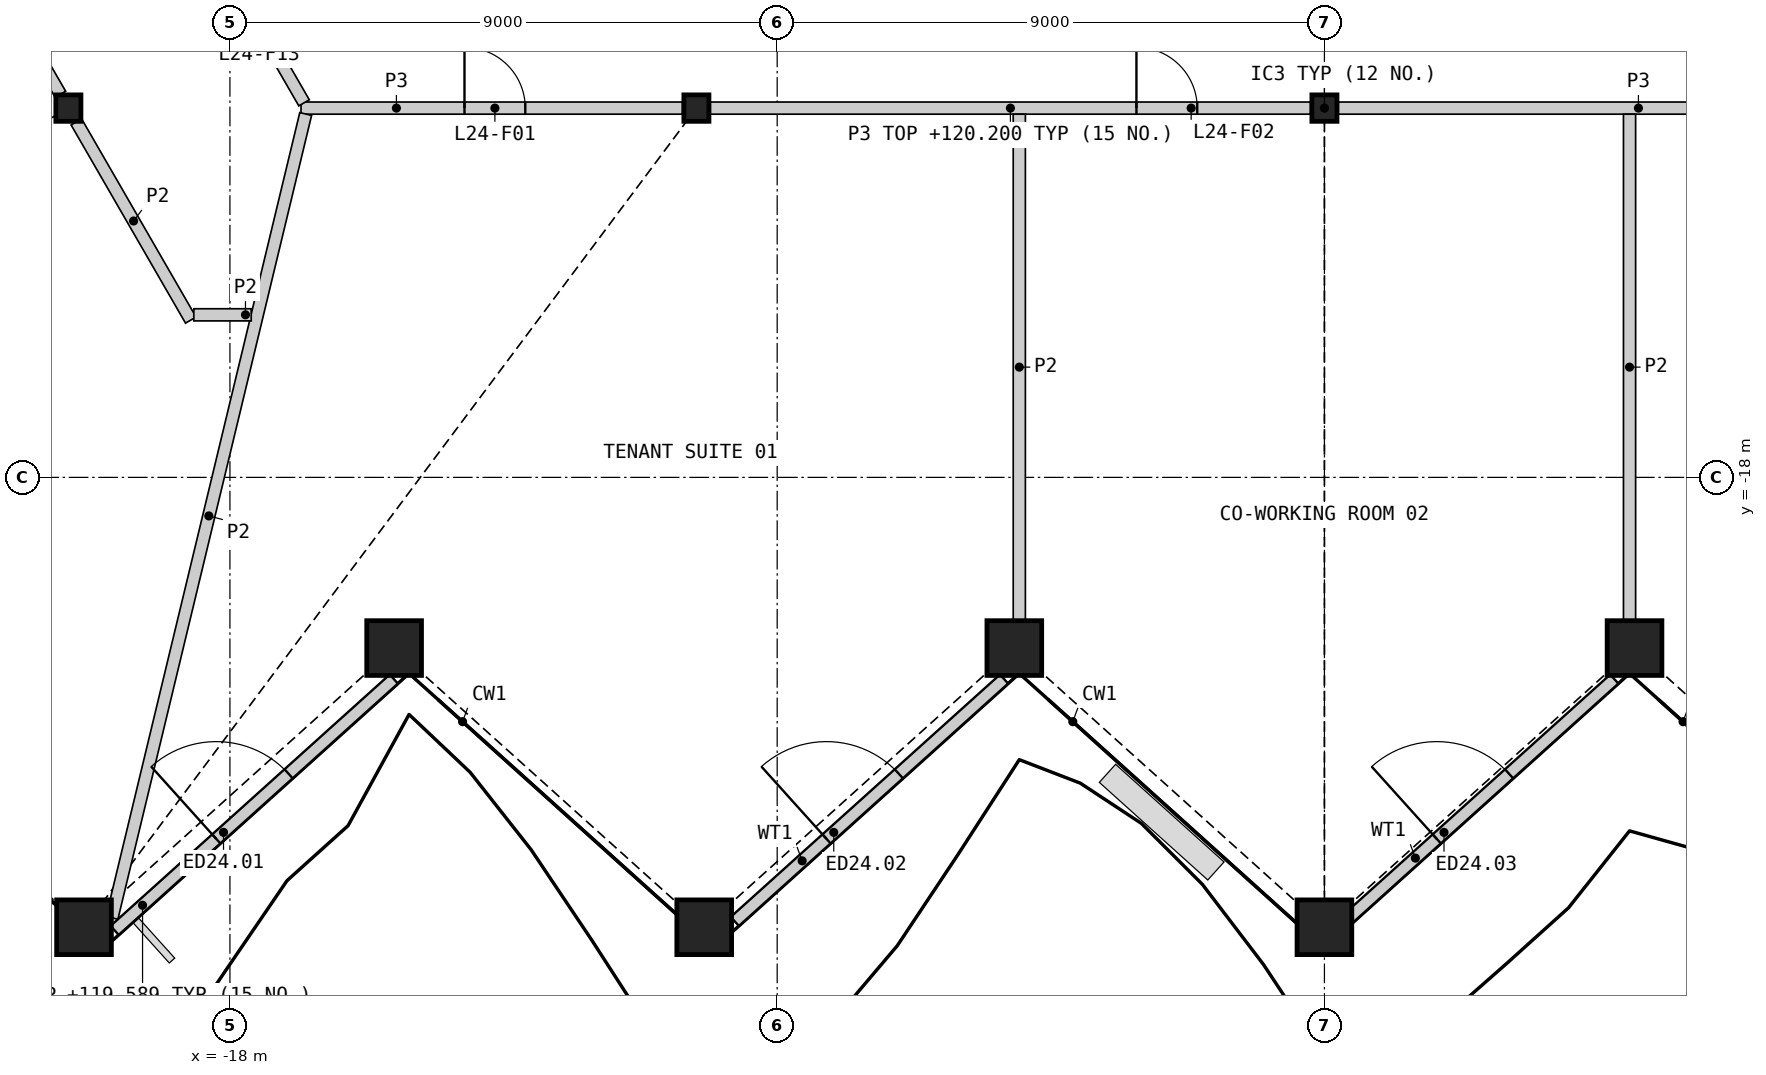
"""IFC4 building model, lengths in metres.
Left out: names, types, materials, properties, quantities, classifications, styles, units other than length and angle.
Written with IfcOpenShell. Run it as: python <this file> out.ifc"""

import sys

from ifc_helpers import new_model, si_unit, direction, frame, frame_2d, origin, origin_2d, place, context, subcontext, project, spatial, rectangle, hollow_rectangle, i_section, extrude, element, fill, save


model = new_model("IFC4")
c1 = context("Model", 3, precision=1e-05, world=origin(), true_north=direction((0.0, 1.0)))
c2 = subcontext(c1, "Body", "Model", "MODEL_VIEW")
j1 = project(units=[si_unit("LENGTHUNIT", "METRE"), si_unit("PLANEANGLEUNIT", "RADIAN")], contexts=[c1])
p1 = place(None, origin())
s1 = spatial("IfcSite", under=j1, at=p1, CompositionType="ELEMENT")
p2 = place(p1, origin())
s2 = spatial("IfcBuilding", under=s1, at=p2, CompositionType="ELEMENT")
p3 = place(p2, frame((0.0, 0.0, 116.4)))
s3 = spatial("IfcBuildingStorey", under=s2, at=p3, CompositionType="ELEMENT", Elevation=116.4)
for number, where, z_axis, x_axis in (
    (1, (-20.4, -25.399, 0.0), (0.0, 0.0, 1.0), (1.0, 0.0, 0.0)),
    (2, (-15.3, -20.807, 0.0), (0.0, 0.0, 1.0), (1.0, 0.0, 0.0)),
    (3, (-10.2, -25.399, 0.0), (0.0, 0.0, 1.0), (1.0, 0.0, 0.0)),
    (4, (-5.1, -20.807, 0.0), (0.0, 0.0, 1.0), (1.0, 0.0, 0.0)),
    (5, (0.0, -25.399, 0.0), (0.0, 0.0, 1.0), (1.0, 0.0, 0.0)),
    (6, (5.1, -20.807, 0.0), (0.0, 0.0, 1.0), (1.0, 0.0, 0.0)),
):
    element("IfcColumn", number, at=place(p3, frame(where, z_axis=z_axis, x_axis=x_axis)), inside=s3, PredefinedType="COLUMN", context=c2, shape_type="SweptSolid", body=[
        extrude(hollow_rectangle(XDim=0.9, YDim=0.9, WallThickness=0.06, at=origin_2d()), origin(), (0.0, 0.0, 1.0), 4.2),
    ])
for number, where, z_axis, x_axis in (
    (7, (-20.657, -11.926, 0.0), (0.0, 0.0, 1.0), (1.0, 0.0, 0.0)),
    (8, (-10.328, -11.926, 0.0), (0.0, 0.0, 1.0), (1.0, 0.0, 0.0)),
    (9, (0.0, -11.926, 0.0), (0.0, 0.0, 1.0), (1.0, 0.0, 0.0)),
):
    element("IfcColumn", number, at=place(p3, frame(where, z_axis=z_axis, x_axis=x_axis)), inside=s3, PredefinedType="COLUMN", context=c2, shape_type="SweptSolid", body=[
        extrude(i_section(OverallWidth=0.412, OverallDepth=0.435, WebThickness=0.036, FlangeThickness=0.057, at=origin_2d()), origin(), (0.0, 0.0, 1.0), 4.2),
    ])
p4 = place(p3, frame((-19.896, -25.451, 0.0), z_axis=(0.0, 0.0, 1.0), x_axis=(0.743162487272, 0.669110990428, 0.0)))
e10 = element("IfcWall", 10, at=p4, inside=s3, PredefinedType="SOLIDWALL", context=c2, shape_type="SweptSolid", body=[
    extrude(rectangle(XDim=6.178, YDim=0.2, at=frame_2d((3.089, 0.0))), origin(), (0.0, 0.0, 1.0), 3.189),
])
p5 = place(p4, frame((2.25, 0.0, 0.0)))
e11 = element("IfcOpeningElement", 11, at=p5, cuts=e10, PredefinedType="OPENING", context=c2, shape_type="SweptSolid", body=[
    extrude(rectangle(XDim=1.6, YDim=2.4, at=frame_2d((0.8, 1.2))), frame((0.0, 0.11, 0.0), z_axis=(0.0, -1.0, 0.0), x_axis=(1.0, 0.0, 0.0)), (0.0, 0.0, 1.0), 0.22),
])
p6 = place(p3, frame((-9.696, -25.303, 0.0), z_axis=(0.0, 0.0, 1.0), x_axis=(0.743141307259, 0.669134513716, 0.0)))
e12 = element("IfcWall", 12, at=p6, inside=s3, PredefinedType="SOLIDWALL", context=c2, shape_type="SweptSolid", body=[
    extrude(rectangle(XDim=5.958, YDim=0.2, at=frame_2d((2.979, 0.0))), origin(), (0.0, 0.0, 1.0), 3.189),
])
p7 = place(p6, frame((2.029, 0.0, 0.0)))
e13 = element("IfcOpeningElement", 13, at=p7, cuts=e12, PredefinedType="OPENING", context=c2, shape_type="SweptSolid", body=[
    extrude(rectangle(XDim=1.6, YDim=2.4, at=frame_2d((0.8, 1.2))), frame((0.0, 0.11, 0.0), z_axis=(0.0, -1.0, 0.0), x_axis=(1.0, 0.0, 0.0)), (0.0, 0.0, 1.0), 0.22),
])
p8 = place(p3, frame((0.406, -25.244, 0.0), z_axis=(0.0, 0.0, 1.0), x_axis=(0.743138997535, 0.669137078888, 0.0)))
e14 = element("IfcWall", 14, at=p8, inside=s3, PredefinedType="SOLIDWALL", context=c2, shape_type="SweptSolid", body=[
    extrude(rectangle(XDim=5.869, YDim=0.2, at=frame_2d((2.935, 0.0))), origin(), (0.0, 0.0, 1.0), 3.189),
])
p9 = place(p8, frame((1.94, 0.0, 0.0)))
e15 = element("IfcOpeningElement", 15, at=p9, cuts=e14, PredefinedType="OPENING", context=c2, shape_type="SweptSolid", body=[
    extrude(rectangle(XDim=1.6, YDim=2.4, at=frame_2d((0.8, 1.2))), frame((0.0, 0.11, 0.0), z_axis=(0.0, -1.0, 0.0), x_axis=(1.0, 0.0, 0.0)), (0.0, 0.0, 1.0), 0.22),
])
p10 = place(p3, frame((-10.101, -11.926, 0.0), z_axis=(0.0, 0.0, 1.0), x_axis=(1.0, 0.0, 0.0)))
e16 = element("IfcWall", 16, at=p10, inside=s3, PredefinedType="PARTITIONING", context=c2, shape_type="SweptSolid", body=[
    extrude(rectangle(XDim=9.874, YDim=0.2, at=frame_2d((4.937, 0.0))), origin(), (0.0, 0.0, 1.0), 3.8),
])
p11 = place(p10, frame((7.01, 0.0, 0.0)))
e17 = element("IfcOpeningElement", 17, at=p11, cuts=e16, PredefinedType="OPENING", context=c2, shape_type="SweptSolid", body=[
    extrude(rectangle(XDim=1.0, YDim=2.1, at=frame_2d((0.5, 1.05))), frame((0.0, 0.11, 0.0), z_axis=(0.0, -1.0, 0.0), x_axis=(1.0, 0.0, 0.0)), (0.0, 0.0, 1.0), 0.22),
])
p12 = place(p3, frame((0.227, -11.926, 0.0), z_axis=(0.0, 0.0, 1.0), x_axis=(1.0, 0.0, 0.0)))
e18 = element("IfcWall", 18, at=p12, inside=s3, PredefinedType="PARTITIONING", context=c2, shape_type="SweptSolid", body=[
    extrude(rectangle(XDim=9.874, YDim=0.2, at=frame_2d((4.937, 0.0))), origin(), (0.0, 0.0, 1.0), 3.8),
])
p13 = place(p3, frame((-16.831, -11.926, 0.0), z_axis=(0.0, 0.0, 1.0), x_axis=(1.0, 0.0, 0.0)))
e19 = element("IfcWall", 19, at=p13, inside=s3, PredefinedType="PARTITIONING", context=c2, shape_type="SweptSolid", body=[
    extrude(rectangle(XDim=6.275, YDim=0.2, at=frame_2d((3.137, 0.0))), origin(), (0.0, 0.0, 1.0), 3.8),
])
p14 = place(p13, frame((2.688, 0.0, 0.0)))
e20 = element("IfcOpeningElement", 20, at=p14, cuts=e19, PredefinedType="OPENING", context=c2, shape_type="SweptSolid", body=[
    extrude(rectangle(XDim=1.0, YDim=2.1, at=frame_2d((0.5, 1.05))), frame((0.0, 0.11, 0.0), z_axis=(0.0, -1.0, 0.0), x_axis=(1.0, 0.0, 0.0)), (0.0, 0.0, 1.0), 0.22),
])
p15 = place(p3, frame((-18.644, -8.613, 0.0), z_axis=(0.0, 0.0, 1.0), x_axis=(0.499958791762, -0.866049194065, 0.0)))
e21 = element("IfcWall", 21, at=p15, inside=s3, PredefinedType="PARTITIONING", context=c2, shape_type="SweptSolid", body=[
    extrude(rectangle(XDim=3.726, YDim=0.2, at=frame_2d((1.863, 0.0))), origin(), (0.0, 0.0, 1.0), 3.8),
])
p16 = place(p15, frame((1.388, 0.0, 0.0)))
e22 = element("IfcOpeningElement", 22, at=p16, cuts=e21, PredefinedType="OPENING", context=c2, shape_type="SweptSolid", body=[
    extrude(rectangle(XDim=0.95, YDim=2.1, at=frame_2d((0.475, 1.05))), frame((0.0, 0.11, 0.0), z_axis=(0.0, -1.0, 0.0), x_axis=(1.0, 0.0, 0.0)), (0.0, 0.0, 1.0), 0.22),
])
p17 = place(p3, frame((-19.94, -25.244, 0.0), z_axis=(0.0, 0.0, 1.0), x_axis=(0.234226353532, 0.972182089586, 0.0)))
e23 = element("IfcWall", 23, at=p17, inside=s3, PredefinedType="PARTITIONING", context=c2, shape_type="SweptSolid", body=[
    extrude(rectangle(XDim=13.599, YDim=0.2, at=frame_2d((6.8, 0.0))), origin(), (0.0, 0.0, 1.0), 2.885),
])
for number, where, z_axis, x_axis in (
    (24, (-5.018, -20.347, 0.0), (0.0, 0.0, 1.0), (0.0, 1.0, 0.0)),
    (25, (5.018, -20.347, 0.0), (0.0, 0.0, 1.0), (0.0, 1.0, 0.0)),
):
    element("IfcWall", number, at=place(p3, frame(where, z_axis=z_axis, x_axis=x_axis)), inside=s3, PredefinedType="PARTITIONING", context=c2, shape_type="SweptSolid", body=[
        extrude(rectangle(XDim=8.321, YDim=0.2, at=frame_2d((4.16, 0.0))), origin(), (0.0, 0.0, 1.0), 2.885),
    ])
p18 = place(p3, frame((-20.526, -12.154, 0.0), z_axis=(0.0, 0.0, 1.0), x_axis=(0.500046282919, -0.86599868068, 0.0)))
e26 = element("IfcWall", 26, at=p18, inside=s3, PredefinedType="PARTITIONING", context=c2, shape_type="SweptSolid", body=[
    extrude(rectangle(XDim=3.763, YDim=0.2, at=frame_2d((1.882, 0.0))), origin(), (0.0, 0.0, 1.0), 2.885),
])
p19 = place(p3, frame((-22.67, -8.44, 0.0), z_axis=(0.0, 0.0, 1.0), x_axis=(0.500018191375, -0.866014900734, 0.0)))
e27 = element("IfcWall", 27, at=p19, inside=s3, PredefinedType="PARTITIONING", context=c2, shape_type="SweptSolid", body=[
    extrude(rectangle(XDim=3.763, YDim=0.2, at=frame_2d((1.882, 0.0))), origin(), (0.0, 0.0, 1.0), 2.885),
])
p20 = place(p19, frame((1.658, 0.0, 0.0)))
e28 = element("IfcOpeningElement", 28, at=p20, cuts=e27, PredefinedType="OPENING", context=c2, shape_type="SweptSolid", body=[
    extrude(rectangle(XDim=0.95, YDim=2.1, at=frame_2d((0.475, 1.05))), frame((0.0, 0.11, 0.0), z_axis=(0.0, -1.0, 0.0), x_axis=(1.0, 0.0, 0.0)), (0.0, 0.0, 1.0), 0.22),
])
p21 = place(p3, frame((-18.594, -15.326, 0.0), z_axis=(0.0, 0.0, 1.0), x_axis=(1.0, 0.0, 0.0)))
e29 = element("IfcWall", 29, at=p21, inside=s3, PredefinedType="PARTITIONING", context=c2, shape_type="SweptSolid", body=[
    extrude(rectangle(XDim=0.944, YDim=0.2, at=frame_2d((0.472, 0.0))), origin(), (0.0, 0.0, 1.0), 2.885),
])
p22 = place(p5, origin())
e30 = element("IfcDoor", 30, at=p22, inside=s3, OperationType="DOUBLE_DOOR_SINGLE_SWING", PredefinedType="DOOR", context=c2, shape_type="SweptSolid", body=[
    extrude(rectangle(XDim=1.6, YDim=2.4, at=frame_2d((0.8, 1.2))), frame((0.0, 0.025, 0.0), z_axis=(0.0, -1.0, 0.0), x_axis=(1.0, 0.0, 0.0)), (0.0, 0.0, 1.0), 0.05),
])
fill(e11, e30)
p23 = place(p7, origin())
e31 = element("IfcDoor", 31, at=p23, inside=s3, OperationType="DOUBLE_DOOR_SINGLE_SWING", PredefinedType="DOOR", context=c2, shape_type="SweptSolid", body=[
    extrude(rectangle(XDim=1.6, YDim=2.4, at=frame_2d((0.8, 1.2))), frame((0.0, 0.025, 0.0), z_axis=(0.0, -1.0, 0.0), x_axis=(1.0, 0.0, 0.0)), (0.0, 0.0, 1.0), 0.05),
])
fill(e13, e31)
p24 = place(p9, origin())
e32 = element("IfcDoor", 32, at=p24, inside=s3, OperationType="DOUBLE_DOOR_SINGLE_SWING", PredefinedType="DOOR", context=c2, shape_type="SweptSolid", body=[
    extrude(rectangle(XDim=1.6, YDim=2.4, at=frame_2d((0.8, 1.2))), frame((0.0, 0.025, 0.0), z_axis=(0.0, -1.0, 0.0), x_axis=(1.0, 0.0, 0.0)), (0.0, 0.0, 1.0), 0.05),
])
fill(e15, e32)
p25 = place(p14, origin())
e33 = element("IfcDoor", 33, at=p25, inside=s3, OperationType="SINGLE_SWING_LEFT", PredefinedType="DOOR", context=c2, shape_type="SweptSolid", body=[
    extrude(rectangle(XDim=1.0, YDim=2.1, at=frame_2d((0.5, 1.05))), frame((0.0, 0.025, 0.0), z_axis=(0.0, -1.0, 0.0), x_axis=(1.0, 0.0, 0.0)), (0.0, 0.0, 1.0), 0.05),
])
fill(e20, e33)
p26 = place(p11, origin())
e34 = element("IfcDoor", 34, at=p26, inside=s3, OperationType="SINGLE_SWING_LEFT", PredefinedType="DOOR", context=c2, shape_type="SweptSolid", body=[
    extrude(rectangle(XDim=1.0, YDim=2.1, at=frame_2d((0.5, 1.05))), frame((0.0, 0.025, 0.0), z_axis=(0.0, -1.0, 0.0), x_axis=(1.0, 0.0, 0.0)), (0.0, 0.0, 1.0), 0.05),
])
fill(e17, e34)
save(model, sys.argv[1])
